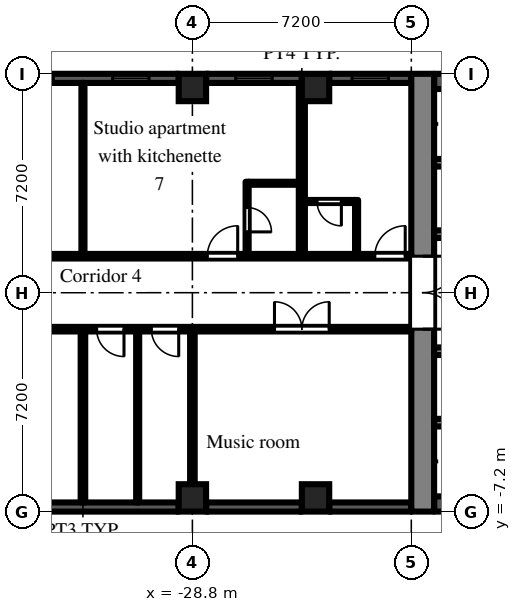
"""IFC4 building model, lengths in metres.
Left out: names, types, materials, properties, quantities, classifications, styles, units other than length and angle.
Written with IfcOpenShell. Run it as: python <this file> out.ifc"""

import sys

from ifc_helpers import new_model, si_unit, direction, frame, frame_2d, origin, origin_2d, place, context, subcontext, project, spatial, rectangle, extrude, element, fill, save


model = new_model("IFC4")
c1 = context("Model", 3, precision=1e-05, world=origin(), true_north=direction((0.0, 1.0)))
c2 = subcontext(c1, "Body", "Model", "MODEL_VIEW")
j1 = project(units=[si_unit("LENGTHUNIT", "METRE"), si_unit("PLANEANGLEUNIT", "RADIAN")], contexts=[c1])
p1 = place(None, origin())
s1 = spatial("IfcSite", under=j1, at=p1, CompositionType="ELEMENT")
p2 = place(p1, origin())
s2 = spatial("IfcBuilding", under=s1, at=p2, CompositionType="ELEMENT")
p3 = place(p2, frame((0.0, 0.0, 53.7)))
s3 = spatial("IfcBuildingStorey", under=s2, at=p3, CompositionType="ELEMENT", Elevation=53.7)
for number, where, z_axis, x_axis in (
    (1, (-28.8, -6.75, 0.0), (0.0, 0.0, 1.0), (1.0, 0.0, 0.0)),
    (2, (-28.8, 6.75, 0.0), (0.0, 0.0, 1.0), (1.0, 0.0, 0.0)),
    (3, (-24.75, -6.75, 0.0), (0.0, 0.0, 1.0), (1.0, 0.0, 0.0)),
    (4, (-24.75, 6.75, 0.0), (0.0, 0.0, 1.0), (1.0, 0.0, 0.0)),
):
    element("IfcColumn", number, at=place(p3, frame(where, z_axis=z_axis, x_axis=x_axis)), inside=s3, PredefinedType="COLUMN", context=c2, shape_type="SweptSolid", body=[
        extrude(rectangle(XDim=0.9, YDim=0.9, at=origin_2d()), origin(), (0.0, 0.0, 1.0), 3.0),
    ])
p4 = place(p3, frame((-21.6, 7.05, 0.0), z_axis=(0.0, 0.0, 1.0), x_axis=(-1.0, 0.0, 0.0)))
e5 = element("IfcWall", 5, at=p4, inside=s3, PredefinedType="SOLIDWALL", context=c2, shape_type="SweptSolid", body=[
    extrude(rectangle(XDim=2.7, YDim=0.3, at=frame_2d((1.35, 0.0))), origin(), (0.0, 0.0, 1.0), 2.1),
])
p5 = place(p4, frame((0.75, 0.0, 0.2)))
e6 = element("IfcOpeningElement", 6, at=p5, cuts=e5, PredefinedType="OPENING", context=c2, shape_type="SweptSolid", body=[
    extrude(rectangle(XDim=1.2, YDim=1.85, at=frame_2d((0.6, 0.925))), frame((0.0, 0.16, 0.0), z_axis=(0.0, -1.0, 0.0), x_axis=(1.0, 0.0, 0.0)), (0.0, 0.0, 1.0), 0.32),
])
p6 = place(p3, frame((-25.2, 7.05, 0.0), z_axis=(0.0, 0.0, 1.0), x_axis=(-1.0, 0.0, 0.0)))
e7 = element("IfcWall", 7, at=p6, inside=s3, PredefinedType="SOLIDWALL", context=c2, shape_type="SweptSolid", body=[
    extrude(rectangle(XDim=3.15, YDim=0.3, at=frame_2d((1.575, 0.0))), origin(), (0.0, 0.0, 1.0), 2.1),
])
p7 = place(p6, frame((0.975, 0.0, 0.2)))
e8 = element("IfcOpeningElement", 8, at=p7, cuts=e7, PredefinedType="OPENING", context=c2, shape_type="SweptSolid", body=[
    extrude(rectangle(XDim=1.2, YDim=1.85, at=frame_2d((0.6, 0.925))), frame((0.0, 0.16, 0.0), z_axis=(0.0, -1.0, 0.0), x_axis=(1.0, 0.0, 0.0)), (0.0, 0.0, 1.0), 0.32),
])
p8 = place(p3, frame((-29.25, 7.05, 0.0), z_axis=(0.0, 0.0, 1.0), x_axis=(-1.0, 0.0, 0.0)))
e9 = element("IfcWall", 9, at=p8, inside=s3, PredefinedType="SOLIDWALL", context=c2, shape_type="SweptSolid", body=[
    extrude(rectangle(XDim=6.3, YDim=0.3, at=frame_2d((3.15, 0.0))), origin(), (0.0, 0.0, 1.0), 2.1),
])
p9 = place(p8, frame((0.975, 0.0, 0.2)))
e10 = element("IfcOpeningElement", 10, at=p9, cuts=e9, PredefinedType="OPENING", context=c2, shape_type="SweptSolid", body=[
    extrude(rectangle(XDim=1.2, YDim=1.85, at=frame_2d((0.6, 0.925))), frame((0.0, 0.16, 0.0), z_axis=(0.0, -1.0, 0.0), x_axis=(1.0, 0.0, 0.0)), (0.0, 0.0, 1.0), 0.32),
])
p10 = place(p8, frame((4.125, 0.0, 0.2)))
e11 = element("IfcOpeningElement", 11, at=p10, cuts=e9, PredefinedType="OPENING", context=c2, shape_type="SweptSolid", body=[
    extrude(rectangle(XDim=1.2, YDim=1.85, at=frame_2d((0.6, 0.925))), frame((0.0, 0.16, 0.0), z_axis=(0.0, -1.0, 0.0), x_axis=(1.0, 0.0, 0.0)), (0.0, 0.0, 1.0), 0.32),
])
p11 = place(p3, frame((-35.55, -7.05, 0.0), z_axis=(0.0, 0.0, 1.0), x_axis=(1.0, 0.0, 0.0)))
e12 = element("IfcWall", 12, at=p11, inside=s3, PredefinedType="SOLIDWALL", context=c2, shape_type="SweptSolid", body=[
    extrude(rectangle(XDim=6.3, YDim=0.3, at=frame_2d((3.15, 0.0))), origin(), (0.0, 0.0, 1.0), 2.1),
])
p12 = place(p3, frame((-28.35, -7.05, 0.0), z_axis=(0.0, 0.0, 1.0), x_axis=(1.0, 0.0, 0.0)))
e13 = element("IfcWall", 13, at=p12, inside=s3, PredefinedType="SOLIDWALL", context=c2, shape_type="SweptSolid", body=[
    extrude(rectangle(XDim=3.15, YDim=0.3, at=frame_2d((1.575, 0.0))), origin(), (0.0, 0.0, 1.0), 2.1),
])
p13 = place(p3, frame((-24.3, -7.05, 0.0), z_axis=(0.0, 0.0, 1.0), x_axis=(1.0, 0.0, 0.0)))
e14 = element("IfcWall", 14, at=p13, inside=s3, PredefinedType="SOLIDWALL", context=c2, shape_type="SweptSolid", body=[
    extrude(rectangle(XDim=2.7, YDim=0.3, at=frame_2d((1.35, 0.0))), origin(), (0.0, 0.0, 1.0), 2.1),
])
p14 = place(p3, frame((-21.225, -7.2, 0.0), z_axis=(0.0, 0.0, 1.0), x_axis=(0.0, 1.0, 0.0)))
e15 = element("IfcWall", 15, at=p14, inside=s3, PredefinedType="SHEAR", context=c2, shape_type="SweptSolid", body=[
    extrude(rectangle(XDim=14.4, YDim=0.75, at=frame_2d((7.2, 0.0))), origin(), (0.0, 0.0, 1.0), 2.575),
])
p15 = place(p14, frame((6.0, 0.0, 0.0)))
e16 = element("IfcOpeningElement", 16, at=p15, cuts=e15, PredefinedType="OPENING", context=c2, shape_type="SweptSolid", body=[
    extrude(rectangle(XDim=2.4, YDim=2.2, at=frame_2d((1.2, 1.1))), frame((0.0, 0.385, 0.0), z_axis=(0.0, -1.0, 0.0), x_axis=(1.0, 0.0, 0.0)), (0.0, 0.0, 1.0), 0.77),
])
p16 = place(p3, frame((-7.9, 6.95, 0.0), z_axis=(0.0, 0.0, 1.0), x_axis=(-1.0, 0.0, 0.0)))
e17 = element("IfcWall", 17, at=p16, inside=s3, PredefinedType="SHEAR", context=c2, shape_type="SweptSolid", body=[
    extrude(rectangle(XDim=12.95, YDim=0.5, at=frame_2d((6.475, 0.0))), origin(), (0.0, 0.0, 1.0), 2.575),
])
p17 = place(p3, frame((-7.9, 1.925, 0.0), z_axis=(0.0, 0.0, 1.0), x_axis=(-1.0, 0.0, 0.0)))
e18 = element("IfcWall", 18, at=p17, inside=s3, PredefinedType="SHEAR", context=c2, shape_type="SweptSolid", body=[
    extrude(rectangle(XDim=12.95, YDim=0.25, at=frame_2d((6.475, 0.0))), origin(), (0.0, 0.0, 1.0), 2.575),
])
p18 = place(p17, frame((0.525, 0.0, 0.0)))
e19 = element("IfcOpeningElement", 19, at=p18, cuts=e18, PredefinedType="OPENING", context=c2, shape_type="SweptSolid", body=[
    extrude(rectangle(XDim=0.9, YDim=2.1, at=frame_2d((0.45, 1.05))), frame((0.0, 0.135, 0.0), z_axis=(0.0, -1.0, 0.0), x_axis=(1.0, 0.0, 0.0)), (0.0, 0.0, 1.0), 0.27),
])
p19 = place(p17, frame((2.625, 0.0, 0.0)))
e20 = element("IfcOpeningElement", 20, at=p19, cuts=e18, PredefinedType="OPENING", context=c2, shape_type="SweptSolid", body=[
    extrude(rectangle(XDim=1.1, YDim=2.1, at=frame_2d((0.55, 1.05))), frame((0.0, 0.135, 0.0), z_axis=(0.0, -1.0, 0.0), x_axis=(1.0, 0.0, 0.0)), (0.0, 0.0, 1.0), 0.27),
])
p20 = place(p17, frame((6.025, 0.0, 0.0)))
e21 = element("IfcOpeningElement", 21, at=p20, cuts=e18, PredefinedType="OPENING", context=c2, shape_type="SweptSolid", body=[
    extrude(rectangle(XDim=0.9, YDim=2.1, at=frame_2d((0.45, 1.05))), frame((0.0, 0.135, 0.0), z_axis=(0.0, -1.0, 0.0), x_axis=(1.0, 0.0, 0.0)), (0.0, 0.0, 1.0), 0.27),
])
p21 = place(p17, frame((9.325, 0.0, 0.0)))
e22 = element("IfcOpeningElement", 22, at=p21, cuts=e18, PredefinedType="OPENING", context=c2, shape_type="SweptSolid", body=[
    extrude(rectangle(XDim=0.9, YDim=2.1, at=frame_2d((0.45, 1.05))), frame((0.0, 0.135, 0.0), z_axis=(0.0, -1.0, 0.0), x_axis=(1.0, 0.0, 0.0)), (0.0, 0.0, 1.0), 0.27),
])
p22 = place(p3, frame((-12.3, 4.275, 0.0), z_axis=(0.0, 0.0, 1.0), x_axis=(-1.0, 0.0, 0.0)))
e23 = element("IfcWall", 23, at=p22, inside=s3, PredefinedType="SHEAR", context=c2, shape_type="SweptSolid", body=[
    extrude(rectangle(XDim=8.55, YDim=0.25, at=frame_2d((4.275, 0.0))), origin(), (0.0, 0.0, 1.0), 2.575),
])
p23 = place(p3, frame((-7.9, -6.95, 0.0), z_axis=(0.0, 0.0, 1.0), x_axis=(-1.0, 0.0, 0.0)))
e24 = element("IfcWall", 24, at=p23, inside=s3, PredefinedType="SHEAR", context=c2, shape_type="SweptSolid", body=[
    extrude(rectangle(XDim=12.95, YDim=0.5, at=frame_2d((6.475, 0.0))), origin(), (0.0, 0.0, 1.0), 2.575),
])
p24 = place(p3, frame((-7.9, -1.925, 0.0), z_axis=(0.0, 0.0, 1.0), x_axis=(-1.0, 0.0, 0.0)))
e25 = element("IfcWall", 25, at=p24, inside=s3, PredefinedType="SHEAR", context=c2, shape_type="SweptSolid", body=[
    extrude(rectangle(XDim=12.95, YDim=0.25, at=frame_2d((6.475, 0.0))), origin(), (0.0, 0.0, 1.0), 2.575),
])
p25 = place(p24, frame((4.825, 0.0, 0.0)))
e26 = element("IfcOpeningElement", 26, at=p25, cuts=e25, PredefinedType="OPENING", context=c2, shape_type="SweptSolid", body=[
    extrude(rectangle(XDim=1.1, YDim=2.1, at=frame_2d((0.55, 1.05))), frame((0.0, 0.135, 0.0), z_axis=(0.0, -1.0, 0.0), x_axis=(1.0, 0.0, 0.0)), (0.0, 0.0, 1.0), 0.27),
])
p26 = place(p24, frame((7.025, 0.0, 0.0)))
e27 = element("IfcOpeningElement", 27, at=p26, cuts=e25, PredefinedType="OPENING", context=c2, shape_type="SweptSolid", body=[
    extrude(rectangle(XDim=1.1, YDim=2.1, at=frame_2d((0.55, 1.05))), frame((0.0, 0.135, 0.0), z_axis=(0.0, -1.0, 0.0), x_axis=(1.0, 0.0, 0.0)), (0.0, 0.0, 1.0), 0.27),
])
p27 = place(p24, frame((9.225, 0.0, 0.0)))
e28 = element("IfcOpeningElement", 28, at=p27, cuts=e25, PredefinedType="OPENING", context=c2, shape_type="SweptSolid", body=[
    extrude(rectangle(XDim=1.1, YDim=2.1, at=frame_2d((0.55, 1.05))), frame((0.0, 0.135, 0.0), z_axis=(0.0, -1.0, 0.0), x_axis=(1.0, 0.0, 0.0)), (0.0, 0.0, 1.0), 0.27),
])
p28 = place(p24, frame((0.525, 0.0, 0.0)))
e29 = element("IfcOpeningElement", 29, at=p28, cuts=e25, PredefinedType="OPENING", context=c2, shape_type="SweptSolid", body=[
    extrude(rectangle(XDim=0.9, YDim=2.1, at=frame_2d((0.45, 1.05))), frame((0.0, 0.135, 0.0), z_axis=(0.0, -1.0, 0.0), x_axis=(1.0, 0.0, 0.0)), (0.0, 0.0, 1.0), 0.27),
])
p29 = place(p24, frame((2.625, 0.0, 0.0)))
e30 = element("IfcOpeningElement", 30, at=p29, cuts=e25, PredefinedType="OPENING", context=c2, shape_type="SweptSolid", body=[
    extrude(rectangle(XDim=1.1, YDim=2.1, at=frame_2d((0.55, 1.05))), frame((0.0, 0.135, 0.0), z_axis=(0.0, -1.0, 0.0), x_axis=(1.0, 0.0, 0.0)), (0.0, 0.0, 1.0), 0.27),
])
p30 = place(p3, frame((-12.3, -4.275, 0.0), z_axis=(0.0, 0.0, 1.0), x_axis=(-1.0, 0.0, 0.0)))
e31 = element("IfcWall", 31, at=p30, inside=s3, PredefinedType="SHEAR", context=c2, shape_type="SweptSolid", body=[
    extrude(rectangle(XDim=8.55, YDim=0.25, at=frame_2d((4.275, 0.0))), origin(), (0.0, 0.0, 1.0), 2.575),
])
p31 = place(p3, frame((-36.5, -1.2, 0.0), z_axis=(0.0, 0.0, 1.0), x_axis=(1.0, 0.0, 0.0)))
e32 = element("IfcWall", 32, at=p31, inside=s3, PredefinedType="PARTITIONING", context=c2, shape_type="SweptSolid", body=[
    extrude(rectangle(XDim=14.9, YDim=0.15, at=frame_2d((7.45, 0.0))), origin(), (0.0, 0.0, 1.0), 2.575),
])
p32 = place(p31, frame((10.4, 0.0, 0.0)))
e33 = element("IfcOpeningElement", 33, at=p32, cuts=e32, PredefinedType="OPENING", context=c2, shape_type="SweptSolid", body=[
    extrude(rectangle(XDim=1.8, YDim=2.1, at=frame_2d((0.9, 1.05))), frame((0.0, 0.085, 0.0), z_axis=(0.0, -1.0, 0.0), x_axis=(1.0, 0.0, 0.0)), (0.0, 0.0, 1.0), 0.17),
])
p33 = place(p31, frame((6.35, 0.0, 0.0)))
e34 = element("IfcOpeningElement", 34, at=p33, cuts=e32, PredefinedType="OPENING", context=c2, shape_type="SweptSolid", body=[
    extrude(rectangle(XDim=0.9, YDim=2.1, at=frame_2d((0.45, 1.05))), frame((0.0, 0.085, 0.0), z_axis=(0.0, -1.0, 0.0), x_axis=(1.0, 0.0, 0.0)), (0.0, 0.0, 1.0), 0.17),
])
p34 = place(p31, frame((4.55, 0.0, 0.0)))
e35 = element("IfcOpeningElement", 35, at=p34, cuts=e32, PredefinedType="OPENING", context=c2, shape_type="SweptSolid", body=[
    extrude(rectangle(XDim=0.9, YDim=2.1, at=frame_2d((0.45, 1.05))), frame((0.0, 0.085, 0.0), z_axis=(0.0, -1.0, 0.0), x_axis=(1.0, 0.0, 0.0)), (0.0, 0.0, 1.0), 0.17),
])
p35 = place(p31, frame((1.15, 0.0, 0.0)))
e36 = element("IfcOpeningElement", 36, at=p35, cuts=e32, PredefinedType="OPENING", context=c2, shape_type="SweptSolid", body=[
    extrude(rectangle(XDim=1.8, YDim=2.1, at=frame_2d((0.9, 1.05))), frame((0.0, 0.085, 0.0), z_axis=(0.0, -1.0, 0.0), x_axis=(1.0, 0.0, 0.0)), (0.0, 0.0, 1.0), 0.17),
])
p36 = place(p3, frame((-36.5, 1.2, 0.0), z_axis=(0.0, 0.0, 1.0), x_axis=(1.0, 0.0, 0.0)))
e37 = element("IfcWall", 37, at=p36, inside=s3, PredefinedType="PARTITIONING", context=c2, shape_type="SweptSolid", body=[
    extrude(rectangle(XDim=14.9, YDim=0.15, at=frame_2d((7.45, 0.0))), origin(), (0.0, 0.0, 1.0), 2.575),
])
p37 = place(p36, frame((13.7, 0.0, 0.0)))
e38 = element("IfcOpeningElement", 38, at=p37, cuts=e37, PredefinedType="OPENING", context=c2, shape_type="SweptSolid", body=[
    extrude(rectangle(XDim=1.0, YDim=2.1, at=frame_2d((0.5, 1.05))), frame((0.0, 0.085, 0.0), z_axis=(0.0, -1.0, 0.0), x_axis=(1.0, 0.0, 0.0)), (0.0, 0.0, 1.0), 0.17),
])
p38 = place(p36, frame((8.19, 0.0, 0.0)))
e39 = element("IfcOpeningElement", 39, at=p38, cuts=e37, PredefinedType="OPENING", context=c2, shape_type="SweptSolid", body=[
    extrude(rectangle(XDim=1.0, YDim=2.1, at=frame_2d((0.5, 1.05))), frame((0.0, 0.085, 0.0), z_axis=(0.0, -1.0, 0.0), x_axis=(1.0, 0.0, 0.0)), (0.0, 0.0, 1.0), 0.17),
])
p39 = place(p36, frame((1.15, 0.0, 0.0)))
e40 = element("IfcOpeningElement", 40, at=p39, cuts=e37, PredefinedType="OPENING", context=c2, shape_type="SweptSolid", body=[
    extrude(rectangle(XDim=1.8, YDim=2.1, at=frame_2d((0.9, 1.05))), frame((0.0, 0.085, 0.0), z_axis=(0.0, -1.0, 0.0), x_axis=(1.0, 0.0, 0.0)), (0.0, 0.0, 1.0), 0.17),
])
p40 = place(p3, frame((-32.4, -6.9, 0.0), z_axis=(0.0, 0.0, 1.0), x_axis=(0.0, 1.0, 0.0)))
e41 = element("IfcWall", 41, at=p40, inside=s3, PredefinedType="PARTITIONING", context=c2, shape_type="SweptSolid", body=[
    extrude(rectangle(XDim=5.625, YDim=0.15, at=frame_2d((2.812, 0.0))), origin(), (0.0, 0.0, 1.0), 2.575),
])
for number, where, z_axis, x_axis in (
    (42, (-32.4, 1.275, 0.0), (0.0, 0.0, 1.0), (0.0, 1.0, 0.0)),
    (43, (-30.6, -6.9, 0.0), (0.0, 0.0, 1.0), (0.0, 1.0, 0.0)),
):
    element("IfcWall", number, at=place(p3, frame(where, z_axis=z_axis, x_axis=x_axis)), inside=s3, PredefinedType="PARTITIONING", context=c2, shape_type="SweptSolid", body=[
        extrude(rectangle(XDim=5.625, YDim=0.1, at=frame_2d((2.812, 0.0))), origin(), (0.0, 0.0, 1.0), 2.575),
    ])
p41 = place(p3, frame((-28.8, -6.9, 0.0), z_axis=(0.0, 0.0, 1.0), x_axis=(0.0, 1.0, 0.0)))
e44 = element("IfcWall", 44, at=p41, inside=s3, PredefinedType="PARTITIONING", context=c2, shape_type="SweptSolid", body=[
    extrude(rectangle(XDim=5.625, YDim=0.15, at=frame_2d((2.812, 0.0))), origin(), (0.0, 0.0, 1.0), 2.575),
])
p42 = place(p3, frame((-27.0, 1.275, 0.0), z_axis=(0.0, 0.0, 1.0), x_axis=(0.0, 1.0, 0.0)))
e45 = element("IfcWall", 45, at=p42, inside=s3, PredefinedType="PARTITIONING", context=c2, shape_type="SweptSolid", body=[
    extrude(rectangle(XDim=2.375, YDim=0.1, at=frame_2d((1.188, 0.0))), origin(), (0.0, 0.0, 1.0), 2.575),
])
p43 = place(p42, frame((0.725, 0.0, 0.0)))
e46 = element("IfcOpeningElement", 46, at=p43, cuts=e45, PredefinedType="OPENING", context=c2, shape_type="SweptSolid", body=[
    extrude(rectangle(XDim=0.8, YDim=2.1, at=frame_2d((0.4, 1.05))), frame((0.0, 0.06, 0.0), z_axis=(0.0, -1.0, 0.0), x_axis=(1.0, 0.0, 0.0)), (0.0, 0.0, 1.0), 0.12),
])
p44 = place(p3, frame((-26.95, 3.6, 0.0), z_axis=(0.0, 0.0, 1.0), x_axis=(1.0, 0.0, 0.0)))
e47 = element("IfcWall", 47, at=p44, inside=s3, PredefinedType="PARTITIONING", context=c2, shape_type="SweptSolid", body=[
    extrude(rectangle(XDim=1.65, YDim=0.1, at=frame_2d((0.825, 0.0))), origin(), (0.0, 0.0, 1.0), 2.575),
])
p45 = place(p3, frame((-25.2, 1.275, 0.0), z_axis=(0.0, 0.0, 1.0), x_axis=(0.0, 1.0, 0.0)))
e48 = element("IfcWall", 48, at=p45, inside=s3, PredefinedType="PARTITIONING", context=c2, shape_type="SweptSolid", body=[
    extrude(rectangle(XDim=5.625, YDim=0.2, at=frame_2d((2.812, 0.0))), origin(), (0.0, 0.0, 1.0), 2.575),
])
p46 = place(p3, frame((-25.1, 3.0, 0.0), z_axis=(0.0, 0.0, 1.0), x_axis=(1.0, 0.0, 0.0)))
e49 = element("IfcWall", 49, at=p46, inside=s3, PredefinedType="PARTITIONING", context=c2, shape_type="SweptSolid", body=[
    extrude(rectangle(XDim=1.75, YDim=0.1, at=frame_2d((0.875, 0.0))), origin(), (0.0, 0.0, 1.0), 2.575),
])
p47 = place(p46, frame((0.4, 0.0, 0.0)))
e50 = element("IfcOpeningElement", 50, at=p47, cuts=e49, PredefinedType="OPENING", context=c2, shape_type="SweptSolid", body=[
    extrude(rectangle(XDim=0.8, YDim=2.1, at=frame_2d((0.4, 1.05))), frame((0.0, 0.06, 0.0), z_axis=(0.0, -1.0, 0.0), x_axis=(1.0, 0.0, 0.0)), (0.0, 0.0, 1.0), 0.12),
])
p48 = place(p3, frame((-23.4, 1.275, 0.0), z_axis=(0.0, 0.0, 1.0), x_axis=(0.0, 1.0, 0.0)))
e51 = element("IfcWall", 51, at=p48, inside=s3, PredefinedType="PARTITIONING", context=c2, shape_type="SweptSolid", body=[
    extrude(rectangle(XDim=1.675, YDim=0.1, at=frame_2d((0.837, 0.0))), origin(), (0.0, 0.0, 1.0), 2.575),
])
p49 = place(p5, origin())
e52 = element("IfcWindow", 52, at=p49, inside=s3, PartitioningType="SINGLE_PANEL", PredefinedType="WINDOW", context=c2, shape_type="SweptSolid", body=[
    extrude(rectangle(XDim=1.2, YDim=1.85, at=frame_2d((0.6, 0.925))), frame((0.0, 0.03, 0.0), z_axis=(0.0, -1.0, 0.0), x_axis=(1.0, 0.0, 0.0)), (0.0, 0.0, 1.0), 0.06),
])
fill(e6, e52)
p50 = place(p7, origin())
e53 = element("IfcWindow", 53, at=p50, inside=s3, PartitioningType="SINGLE_PANEL", PredefinedType="WINDOW", context=c2, shape_type="SweptSolid", body=[
    extrude(rectangle(XDim=1.2, YDim=1.85, at=frame_2d((0.6, 0.925))), frame((0.0, 0.03, 0.0), z_axis=(0.0, -1.0, 0.0), x_axis=(1.0, 0.0, 0.0)), (0.0, 0.0, 1.0), 0.06),
])
fill(e8, e53)
p51 = place(p9, origin())
e54 = element("IfcWindow", 54, at=p51, inside=s3, PartitioningType="SINGLE_PANEL", PredefinedType="WINDOW", context=c2, shape_type="SweptSolid", body=[
    extrude(rectangle(XDim=1.2, YDim=1.85, at=frame_2d((0.6, 0.925))), frame((0.0, 0.03, 0.0), z_axis=(0.0, -1.0, 0.0), x_axis=(1.0, 0.0, 0.0)), (0.0, 0.0, 1.0), 0.06),
])
fill(e10, e54)
p52 = place(p10, origin())
e55 = element("IfcWindow", 55, at=p52, inside=s3, PartitioningType="SINGLE_PANEL", PredefinedType="WINDOW", context=c2, shape_type="SweptSolid", body=[
    extrude(rectangle(XDim=1.2, YDim=1.85, at=frame_2d((0.6, 0.925))), frame((0.0, 0.03, 0.0), z_axis=(0.0, -1.0, 0.0), x_axis=(1.0, 0.0, 0.0)), (0.0, 0.0, 1.0), 0.06),
])
fill(e11, e55)
p53 = place(p15, frame((2.4, 0.0, 0.0), z_axis=(0.0, 0.0, 1.0), x_axis=(-1.0, 0.0, 0.0)))
e56 = element("IfcDoor", 56, at=p53, inside=s3, OperationType="DOUBLE_DOOR_DOUBLE_SWING", PredefinedType="DOOR", context=c2, shape_type="SweptSolid", body=[
    extrude(rectangle(XDim=2.4, YDim=2.2, at=frame_2d((1.2, 1.1))), frame((0.0, 0.025, 0.0), z_axis=(0.0, -1.0, 0.0), x_axis=(1.0, 0.0, 0.0)), (0.0, 0.0, 1.0), 0.05),
])
fill(e16, e56)
p54 = place(p32, origin())
e57 = element("IfcDoor", 57, at=p54, inside=s3, OperationType="DOUBLE_DOOR_DOUBLE_SWING", PredefinedType="DOOR", context=c2, shape_type="SweptSolid", body=[
    extrude(rectangle(XDim=1.8, YDim=2.1, at=frame_2d((0.9, 1.05))), frame((0.0, 0.025, 0.0), z_axis=(0.0, -1.0, 0.0), x_axis=(1.0, 0.0, 0.0)), (0.0, 0.0, 1.0), 0.05),
])
fill(e33, e57)
p55 = place(p33, frame((0.9, 0.0, 0.0), z_axis=(0.0, 0.0, 1.0), x_axis=(-1.0, 0.0, 0.0)))
e58 = element("IfcDoor", 58, at=p55, inside=s3, OperationType="SINGLE_SWING_LEFT", PredefinedType="DOOR", context=c2, shape_type="SweptSolid", body=[
    extrude(rectangle(XDim=0.9, YDim=2.1, at=frame_2d((0.45, 1.05))), frame((0.0, 0.025, 0.0), z_axis=(0.0, -1.0, 0.0), x_axis=(1.0, 0.0, 0.0)), (0.0, 0.0, 1.0), 0.05),
])
fill(e34, e58)
p56 = place(p34, frame((0.9, 0.0, 0.0), z_axis=(0.0, 0.0, 1.0), x_axis=(-1.0, 0.0, 0.0)))
e59 = element("IfcDoor", 59, at=p56, inside=s3, OperationType="SINGLE_SWING_LEFT", PredefinedType="DOOR", context=c2, shape_type="SweptSolid", body=[
    extrude(rectangle(XDim=0.9, YDim=2.1, at=frame_2d((0.45, 1.05))), frame((0.0, 0.025, 0.0), z_axis=(0.0, -1.0, 0.0), x_axis=(1.0, 0.0, 0.0)), (0.0, 0.0, 1.0), 0.05),
])
fill(e35, e59)
p57 = place(p47, frame((0.8, 0.0, 0.0), z_axis=(0.0, 0.0, 1.0), x_axis=(-1.0, 0.0, 0.0)))
e60 = element("IfcDoor", 60, at=p57, inside=s3, OperationType="SINGLE_SWING_LEFT", PredefinedType="DOOR", context=c2, shape_type="SweptSolid", body=[
    extrude(rectangle(XDim=0.8, YDim=2.1, at=frame_2d((0.4, 1.05))), frame((0.0, 0.025, 0.0), z_axis=(0.0, -1.0, 0.0), x_axis=(1.0, 0.0, 0.0)), (0.0, 0.0, 1.0), 0.05),
])
fill(e50, e60)
p58 = place(p37, origin())
e61 = element("IfcDoor", 61, at=p58, inside=s3, OperationType="SINGLE_SWING_RIGHT", PredefinedType="DOOR", context=c2, shape_type="SweptSolid", body=[
    extrude(rectangle(XDim=1.0, YDim=2.1, at=frame_2d((0.5, 1.05))), frame((0.0, 0.025, 0.0), z_axis=(0.0, -1.0, 0.0), x_axis=(1.0, 0.0, 0.0)), (0.0, 0.0, 1.0), 0.05),
])
fill(e38, e61)
p59 = place(p43, frame((0.8, 0.0, 0.0), z_axis=(0.0, 0.0, 1.0), x_axis=(-1.0, 0.0, 0.0)))
e62 = element("IfcDoor", 62, at=p59, inside=s3, OperationType="SINGLE_SWING_RIGHT", PredefinedType="DOOR", context=c2, shape_type="SweptSolid", body=[
    extrude(rectangle(XDim=0.8, YDim=2.1, at=frame_2d((0.4, 1.05))), frame((0.0, 0.025, 0.0), z_axis=(0.0, -1.0, 0.0), x_axis=(1.0, 0.0, 0.0)), (0.0, 0.0, 1.0), 0.05),
])
fill(e46, e62)
p60 = place(p38, origin())
e63 = element("IfcDoor", 63, at=p60, inside=s3, OperationType="SINGLE_SWING_RIGHT", PredefinedType="DOOR", context=c2, shape_type="SweptSolid", body=[
    extrude(rectangle(XDim=1.0, YDim=2.1, at=frame_2d((0.5, 1.05))), frame((0.0, 0.025, 0.0), z_axis=(0.0, -1.0, 0.0), x_axis=(1.0, 0.0, 0.0)), (0.0, 0.0, 1.0), 0.05),
])
fill(e39, e63)
save(model, sys.argv[1])
